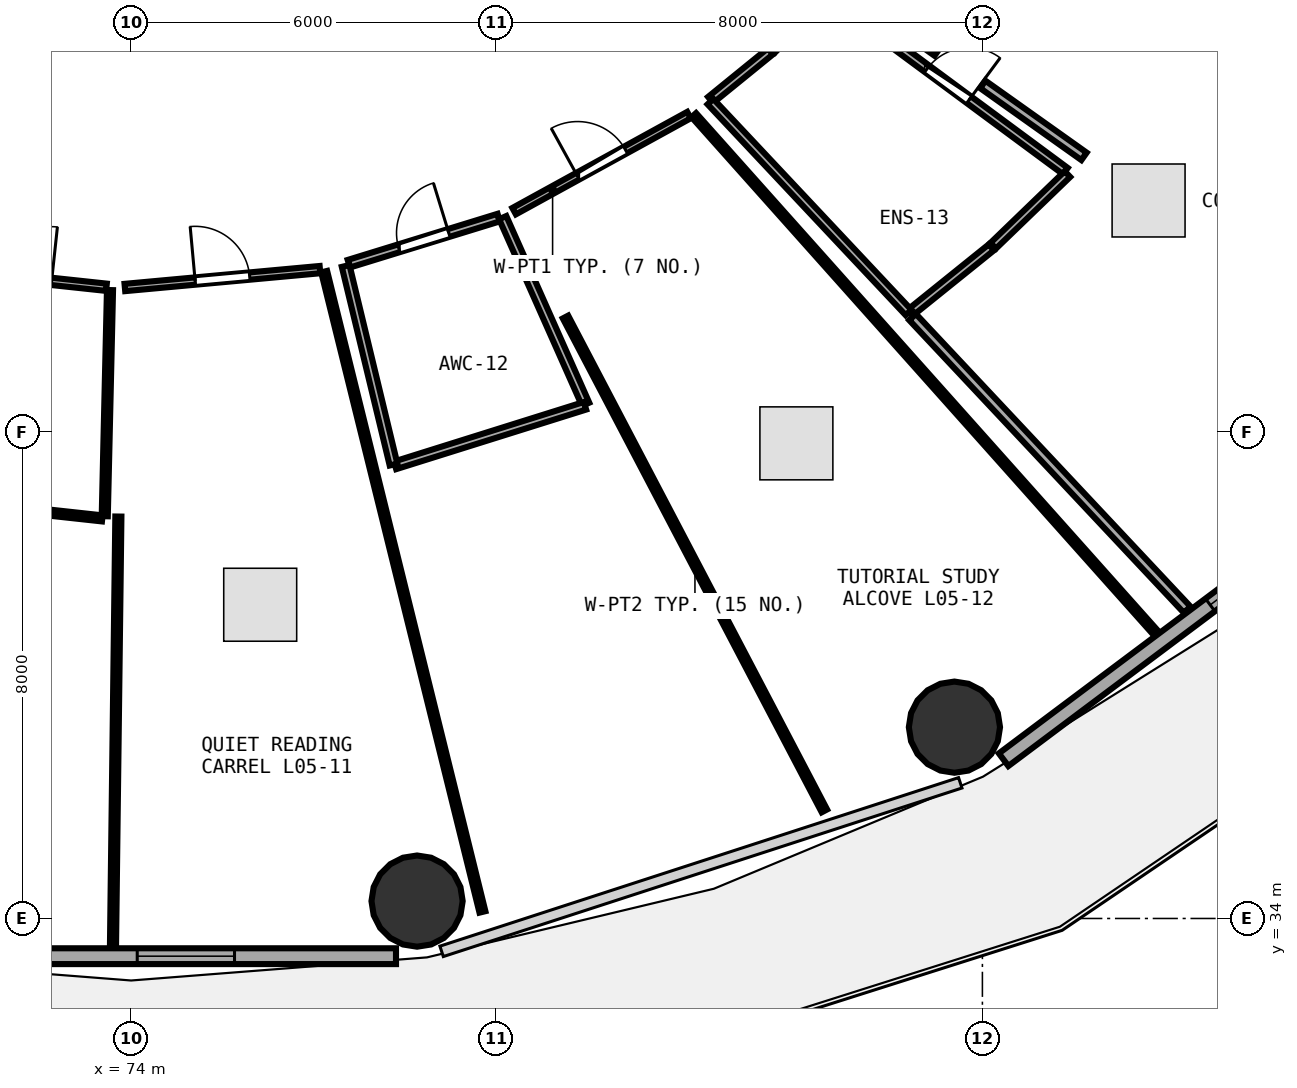
"""IFC4 building model, lengths in metres.
Left out: names, types, materials, properties, quantities, classifications, styles, units other than length and angle.
Written with IfcOpenShell. Run it as: python <this file> out.ifc"""

import sys

from ifc_helpers import new_model, si_unit, direction, frame, frame_2d, origin, origin_2d, place, context, subcontext, project, spatial, rectangle, circle, extrude, element, fill, save


model = new_model("IFC4")
c1 = context("Model", 3, precision=1e-05, world=origin(), true_north=direction((0.0, 1.0)))
c2 = subcontext(c1, "Body", "Model", "MODEL_VIEW")
j1 = project(units=[si_unit("LENGTHUNIT", "METRE"), si_unit("PLANEANGLEUNIT", "RADIAN")], contexts=[c1])
p1 = place(None, origin())
s1 = spatial("IfcSite", under=j1, at=p1, CompositionType="ELEMENT")
p2 = place(p1, origin())
s2 = spatial("IfcBuilding", under=s1, at=p2, CompositionType="ELEMENT")
p3 = place(p2, frame((0.0, 0.0, 22.5)))
s3 = spatial("IfcBuildingStorey", under=s2, at=p3, CompositionType="ELEMENT", Elevation=22.5)
for number, where, z_axis, x_axis in (
    (1, (78.702, 34.286, 0.0), (0.0, 0.0, 1.0), (1.0, 0.0, 0.0)),
    (2, (87.54, 37.146, 0.0), (0.0, 0.0, 1.0), (1.0, 0.0, 0.0)),
):
    element("IfcColumn", number, at=place(p3, frame(where, z_axis=z_axis, x_axis=x_axis)), inside=s3, PredefinedType="COLUMN", context=c2, shape_type="SweptSolid", body=[
        extrude(circle(Radius=0.75, at=origin_2d()), origin(), (0.0, 0.0, 1.0), 3.75),
    ])
p4 = place(p3, frame((69.644, 33.38, 0.0), z_axis=(0.0, 0.0, 1.0), x_axis=(1.0, 0.0, 0.0)))
e3 = element("IfcWall", 3, at=p4, inside=s3, PredefinedType="SOLIDWALL", context=c2, shape_type="SweptSolid", body=[
    extrude(rectangle(XDim=8.712, YDim=0.26, at=frame_2d((4.356, 0.0))), origin(), (0.0, 0.0, 1.0), 3.475),
])
p5 = place(p4, frame((4.456, 0.0, 0.85)))
e4 = element("IfcOpeningElement", 4, at=p5, cuts=e3, PredefinedType="OPENING", context=c2, shape_type="SweptSolid", body=[
    extrude(rectangle(XDim=1.6, YDim=1.45, at=frame_2d((0.8, 0.725))), frame((0.0, 0.14, 0.0), z_axis=(0.0, -1.0, 0.0), x_axis=(1.0, 0.0, 0.0)), (0.0, 0.0, 1.0), 0.28),
])
p6 = place(p3, frame((88.349, 36.611, 0.0), z_axis=(0.0, 0.0, 1.0), x_axis=(0.80030733173, 0.599590005569, 0.0)))
e5 = element("IfcWall", 5, at=p6, inside=s3, PredefinedType="SOLIDWALL", context=c2, shape_type="SweptSolid", body=[
    extrude(rectangle(XDim=8.291, YDim=0.26, at=frame_2d((4.145, 0.0))), origin(), (0.0, 0.0, 1.0), 3.475),
])
p7 = place(p6, frame((4.245, 0.0, 0.85)))
e6 = element("IfcOpeningElement", 6, at=p7, cuts=e5, PredefinedType="OPENING", context=c2, shape_type="SweptSolid", body=[
    extrude(rectangle(XDim=1.6, YDim=1.45, at=frame_2d((0.8, 0.725))), frame((0.0, 0.14, 0.0), z_axis=(0.0, -1.0, 0.0), x_axis=(1.0, 0.0, 0.0)), (0.0, 0.0, 1.0), 0.28),
])
p8 = place(p3, frame((70.895, 44.67, 0.0), z_axis=(0.0, 0.0, 1.0), x_axis=(0.994302004983, -0.106599825921, 0.0)))
e7 = element("IfcWall", 7, at=p8, inside=s3, PredefinedType="PARTITIONING", context=c2, shape_type="SweptSolid", body=[
    extrude(rectangle(XDim=2.714, YDim=0.12, at=frame_2d((1.357, 0.0))), origin(), (0.0, 0.0, 1.0), 3.235),
])
p9 = place(p8, frame((0.907, 0.0, 0.0)))
e8 = element("IfcOpeningElement", 8, at=p9, cuts=e7, PredefinedType="OPENING", context=c2, shape_type="SweptSolid", body=[
    extrude(rectangle(XDim=0.9, YDim=2.08, at=frame_2d((0.45, 1.04))), frame((0.0, 0.07, 0.0), z_axis=(0.0, -1.0, 0.0), x_axis=(1.0, 0.0, 0.0)), (0.0, 0.0, 1.0), 0.14),
])
p10 = place(p3, frame((73.897, 44.376, 0.0), z_axis=(0.0, 0.0, 1.0), x_axis=(0.995829610124, 0.091232601628, 0.0)))
e9 = element("IfcWall", 9, at=p10, inside=s3, PredefinedType="PARTITIONING", context=c2, shape_type="SweptSolid", body=[
    extrude(rectangle(XDim=3.222, YDim=0.12, at=frame_2d((1.611, 0.0))), origin(), (0.0, 0.0, 1.0), 3.235),
])
p11 = place(p10, frame((1.161, 0.0, 0.0)))
e10 = element("IfcOpeningElement", 10, at=p11, cuts=e9, PredefinedType="OPENING", context=c2, shape_type="SweptSolid", body=[
    extrude(rectangle(XDim=0.9, YDim=2.08, at=frame_2d((0.45, 1.04))), frame((0.0, 0.07, 0.0), z_axis=(0.0, -1.0, 0.0), x_axis=(1.0, 0.0, 0.0)), (0.0, 0.0, 1.0), 0.14),
])
p12 = place(p3, frame((77.58, 44.768, 0.0), z_axis=(0.0, 0.0, 1.0), x_axis=(0.955754448098, 0.294165659011, 0.0)))
e11 = element("IfcWall", 11, at=p12, inside=s3, PredefinedType="PLUMBINGWALL", context=c2, shape_type="SweptSolid", body=[
    extrude(rectangle(XDim=2.579, YDim=0.13, at=frame_2d((1.29, 0.0))), origin(), (0.0, 0.0, 1.0), 3.235),
])
p13 = place(p12, frame((0.86, 0.0, 0.0)))
e12 = element("IfcOpeningElement", 12, at=p13, cuts=e11, PredefinedType="OPENING", context=c2, shape_type="SweptSolid", body=[
    extrude(rectangle(XDim=0.86, YDim=2.05, at=frame_2d((0.43, 1.025))), frame((0.0, 0.075, 0.0), z_axis=(0.0, -1.0, 0.0), x_axis=(1.0, 0.0, 0.0)), (0.0, 0.0, 1.0), 0.15),
])
p14 = place(p3, frame((80.299, 45.632, 0.0), z_axis=(0.0, 0.0, 1.0), x_axis=(0.876387079092, 0.481607399861, 0.0)))
e13 = element("IfcWall", 13, at=p14, inside=s3, PredefinedType="PARTITIONING", context=c2, shape_type="SweptSolid", body=[
    extrude(rectangle(XDim=3.281, YDim=0.12, at=frame_2d((1.641, 0.0))), origin(), (0.0, 0.0, 1.0), 2.875),
])
p15 = place(p14, frame((1.191, 0.0, 0.0)))
e14 = element("IfcOpeningElement", 14, at=p15, cuts=e13, PredefinedType="OPENING", context=c2, shape_type="SweptSolid", body=[
    extrude(rectangle(XDim=0.9, YDim=2.08, at=frame_2d((0.45, 1.04))), frame((0.0, 0.07, 0.0), z_axis=(0.0, -1.0, 0.0), x_axis=(1.0, 0.0, 0.0)), (0.0, 0.0, 1.0), 0.14),
])
p16 = place(p3, frame((85.506, 49.143, 0.0), z_axis=(0.0, 0.0, 1.0), x_axis=(0.80412644244, -0.594458295063, 0.0)))
e15 = element("IfcWall", 15, at=p16, inside=s3, PredefinedType="PLUMBINGWALL", context=c2, shape_type="SweptSolid", body=[
    extrude(rectangle(XDim=4.799, YDim=0.13, at=frame_2d((2.399, 0.0))), origin(), (0.0, 0.0, 1.0), 2.875),
])
p17 = place(p16, frame((1.969, 0.0, 0.0)))
e16 = element("IfcOpeningElement", 16, at=p17, cuts=e15, PredefinedType="OPENING", context=c2, shape_type="SweptSolid", body=[
    extrude(rectangle(XDim=0.86, YDim=2.05, at=frame_2d((0.43, 1.025))), frame((0.0, 0.075, 0.0), z_axis=(0.0, -1.0, 0.0), x_axis=(1.0, 0.0, 0.0)), (0.0, 0.0, 1.0), 0.15),
])
p18 = place(p3, frame((73.652, 44.334, 0.0), z_axis=(0.0, 0.0, 1.0), x_axis=(-0.02316715399, -0.99973160547, 0.0)))
e17 = element("IfcWall", 17, at=p18, inside=s3, PredefinedType="PARTITIONING", context=c2, shape_type="SweptSolid", body=[
    extrude(rectangle(XDim=3.72, YDim=0.1, at=frame_2d((1.86, 0.0))), origin(), (0.0, 0.0, 1.0), 3.175),
])
p19 = place(p3, frame((73.525, 40.579, 0.0), z_axis=(0.0, 0.0, 1.0), x_axis=(-0.994070147468, 0.108740709544, 0.0)))
e18 = element("IfcWall", 18, at=p19, inside=s3, PredefinedType="PARTITIONING", context=c2, shape_type="SweptSolid", body=[
    extrude(rectangle(XDim=3.471, YDim=0.1, at=frame_2d((1.735, 0.0))), origin(), (0.0, 0.0, 1.0), 3.175),
])
p20 = place(p3, frame((77.175, 44.637, 0.0), z_axis=(0.0, 0.0, 1.0), x_axis=(0.239971369295, -0.970779965759, 0.0)))
e19 = element("IfcWall", 19, at=p20, inside=s3, PredefinedType="PARTITIONING", context=c2, shape_type="SweptSolid", body=[
    extrude(rectangle(XDim=10.846, YDim=0.1, at=frame_2d((5.423, 0.0))), origin(), (0.0, 0.0, 1.0), 2.875),
])
p21 = place(p3, frame((73.701, 33.561, 0.0), z_axis=(0.0, 0.0, 1.0), x_axis=(0.012537113793, 0.9999214073, 0.0)))
e20 = element("IfcWall", 20, at=p21, inside=s3, PredefinedType="PARTITIONING", context=c2, shape_type="SweptSolid", body=[
    extrude(rectangle(XDim=7.049, YDim=0.1, at=frame_2d((3.525, 0.0))), origin(), (0.0, 0.0, 1.0), 2.875),
])
p22 = place(p3, frame((80.111, 45.526, 0.0), z_axis=(0.0, 0.0, 1.0), x_axis=(0.405936178007, -0.913901427608, 0.0)))
e21 = element("IfcWall", 21, at=p22, inside=s3, PredefinedType="PLUMBINGWALL", context=c2, shape_type="SweptSolid", body=[
    extrude(rectangle(XDim=3.36, YDim=0.13, at=frame_2d((1.68, 0.0))), origin(), (0.0, 0.0, 1.0), 2.875),
])
p23 = place(p3, frame((81.464, 42.431, 0.0), z_axis=(0.0, 0.0, 1.0), x_axis=(-0.954175708416, -0.299246917226, 0.0)))
e22 = element("IfcWall", 22, at=p23, inside=s3, PredefinedType="PLUMBINGWALL", context=c2, shape_type="SweptSolid", body=[
    extrude(rectangle(XDim=3.275, YDim=0.13, at=frame_2d((1.637, 0.0))), origin(), (0.0, 0.0, 1.0), 2.875),
])
p24 = place(p3, frame((78.315, 41.464, 0.0), z_axis=(0.0, 0.0, 1.0), x_axis=(-0.234406131581, 0.972138758345, 0.0)))
e23 = element("IfcWall", 23, at=p24, inside=s3, PredefinedType="PLUMBINGWALL", context=c2, shape_type="SweptSolid", body=[
    extrude(rectangle(XDim=3.36, YDim=0.13, at=frame_2d((1.68, 0.0))), origin(), (0.0, 0.0, 1.0), 3.235),
])
p25 = place(p3, frame((83.254, 47.211, 0.0), z_axis=(0.0, 0.0, 1.0), x_axis=(0.66580890104, -0.746122313897, 0.0)))
e24 = element("IfcWall", 24, at=p25, inside=s3, PredefinedType="PARTITIONING", context=c2, shape_type="SweptSolid", body=[
    extrude(rectangle(XDim=11.399, YDim=0.1, at=frame_2d((5.7, 0.0))), origin(), (0.0, 0.0, 1.0), 2.875),
])
p26 = place(p3, frame((85.401, 35.769, 0.0), z_axis=(0.0, 0.0, 1.0), x_axis=(-0.464308397246, 0.885673592384, 0.0)))
e25 = element("IfcWall", 25, at=p26, inside=s3, PredefinedType="PARTITIONING", context=c2, shape_type="SweptSolid", body=[
    extrude(rectangle(XDim=9.17, YDim=0.1, at=frame_2d((4.585, 0.0))), origin(), (0.0, 0.0, 1.0), 2.875),
])
p27 = place(p3, frame((83.53, 47.461, 0.0), z_axis=(0.0, 0.0, 1.0), x_axis=(0.77596084644, 0.63078107517, 0.0)))
e26 = element("IfcWall", 26, at=p27, inside=s3, PredefinedType="PLUMBINGWALL", context=c2, shape_type="SweptSolid", body=[
    extrude(rectangle(XDim=1.268, YDim=0.13, at=frame_2d((0.634, 0.0))), origin(), (0.0, 0.0, 1.0), 2.875),
])
p28 = place(p3, frame((84.543, 48.287, 0.0), z_axis=(0.0, 0.0, 1.0), x_axis=(0.715980731769, 0.698120041064, 0.0)))
e27 = element("IfcWall", 27, at=p28, inside=s3, PredefinedType="PLUMBINGWALL", context=c2, shape_type="SweptSolid", body=[
    extrude(rectangle(XDim=1.258, YDim=0.13, at=frame_2d((0.629, 0.0))), origin(), (0.0, 0.0, 1.0), 2.875),
])
p29 = place(p3, frame((89.399, 46.241, 0.0), z_axis=(0.0, 0.0, 1.0), x_axis=(-0.719664402118, -0.694322078234, 0.0)))
e28 = element("IfcWall", 28, at=p29, inside=s3, PredefinedType="PLUMBINGWALL", context=c2, shape_type="SweptSolid", body=[
    extrude(rectangle(XDim=1.696, YDim=0.13, at=frame_2d((0.848, 0.0))), origin(), (0.0, 0.0, 1.0), 2.875),
])
p30 = place(p3, frame((88.148, 45.038, 0.0), z_axis=(0.0, 0.0, 1.0), x_axis=(-0.778806140639, -0.627264693174, 0.0)))
e29 = element("IfcWall", 29, at=p30, inside=s3, PredefinedType="PLUMBINGWALL", context=c2, shape_type="SweptSolid", body=[
    extrude(rectangle(XDim=1.713, YDim=0.13, at=frame_2d((0.856, 0.0))), origin(), (0.0, 0.0, 1.0), 3.175),
])
p31 = place(p3, frame((86.785, 43.966, 0.0), z_axis=(0.0, 0.0, 1.0), x_axis=(-0.68469858897, 0.728826345753, 0.0)))
e30 = element("IfcWall", 30, at=p31, inside=s3, PredefinedType="PLUMBINGWALL", context=c2, shape_type="SweptSolid", body=[
    extrude(rectangle(XDim=4.758, YDim=0.13, at=frame_2d((2.379, 0.0))), origin(), (0.0, 0.0, 1.0), 2.875),
])
p32 = place(p3, frame((87.498, 51.921, 0.0), z_axis=(0.0, 0.0, 1.0), x_axis=(0.917695041134, -0.397285554077, 0.0)))
e31 = element("IfcWall", 31, at=p32, inside=s3, PredefinedType="PARTITIONING", context=c2, shape_type="SweptSolid", body=[
    extrude(rectangle(XDim=12.07, YDim=0.15, at=frame_2d((6.035, 0.0))), origin(), (0.0, 0.0, 1.0), 2.875),
])
p33 = place(p3, frame((91.368, 39.078, 0.0), z_axis=(0.0, 0.0, 1.0), x_axis=(-0.684296653493, 0.729203736975, 0.0)))
e32 = element("IfcWall", 32, at=p33, inside=s3, PredefinedType="PARTITIONING", context=c2, shape_type="SweptSolid", body=[
    extrude(rectangle(XDim=6.6, YDim=0.15, at=frame_2d((3.3, 0.0))), origin(), (0.0, 0.0, 1.0), 2.875),
])
p34 = place(p3, frame((89.671, 46.533, 0.0), z_axis=(0.0, 0.0, 1.0), x_axis=(-0.815281399299, 0.579064970411, 0.0)))
e33 = element("IfcWall", 33, at=p34, inside=s3, PredefinedType="PARTITIONING", context=c2, shape_type="SweptSolid", body=[
    extrude(rectangle(XDim=2.042, YDim=0.15, at=frame_2d((1.021, 0.0))), origin(), (0.0, 0.0, 1.0), 3.48),
])
p35 = place(p3, frame((87.256, 48.249, 0.0), z_axis=(0.0, 0.0, 1.0), x_axis=(-0.815270043711, 0.579080957922, 0.0)))
e34 = element("IfcWall", 34, at=p35, inside=s3, PredefinedType="PARTITIONING", context=c2, shape_type="SweptSolid", body=[
    extrude(rectangle(XDim=1.929, YDim=0.15, at=frame_2d((0.964, 0.0))), origin(), (0.0, 0.0, 1.0), 3.235),
])
p36 = place(p5, origin())
e35 = element("IfcWindow", 35, at=p36, inside=s3, PartitioningType="SINGLE_PANEL", PredefinedType="WINDOW", context=c2, shape_type="SweptSolid", body=[
    extrude(rectangle(XDim=1.6, YDim=1.45, at=frame_2d((0.8, 0.725))), frame((0.0, 0.03, 0.0), z_axis=(0.0, -1.0, 0.0), x_axis=(1.0, 0.0, 0.0)), (0.0, 0.0, 1.0), 0.06),
])
fill(e4, e35)
p37 = place(p7, origin())
e36 = element("IfcWindow", 36, at=p37, inside=s3, PartitioningType="SINGLE_PANEL", PredefinedType="WINDOW", context=c2, shape_type="SweptSolid", body=[
    extrude(rectangle(XDim=1.6, YDim=1.45, at=frame_2d((0.8, 0.725))), frame((0.0, 0.03, 0.0), z_axis=(0.0, -1.0, 0.0), x_axis=(1.0, 0.0, 0.0)), (0.0, 0.0, 1.0), 0.06),
])
fill(e6, e36)
p38 = place(p11, origin())
e37 = element("IfcDoor", 37, at=p38, inside=s3, OperationType="SINGLE_SWING_LEFT", PredefinedType="DOOR", context=c2, shape_type="SweptSolid", body=[
    extrude(rectangle(XDim=0.9, YDim=2.08, at=frame_2d((0.45, 1.04))), frame((0.0, 0.025, 0.0), z_axis=(0.0, -1.0, 0.0), x_axis=(1.0, 0.0, 0.0)), (0.0, 0.0, 1.0), 0.05),
])
fill(e10, e37)
p39 = place(p13, origin())
e38 = element("IfcDoor", 38, at=p39, inside=s3, OperationType="SINGLE_SWING_RIGHT", PredefinedType="DOOR", context=c2, shape_type="SweptSolid", body=[
    extrude(rectangle(XDim=0.86, YDim=2.05, at=frame_2d((0.43, 1.025))), frame((0.0, 0.025, 0.0), z_axis=(0.0, -1.0, 0.0), x_axis=(1.0, 0.0, 0.0)), (0.0, 0.0, 1.0), 0.05),
])
fill(e12, e38)
p40 = place(p15, origin())
e39 = element("IfcDoor", 39, at=p40, inside=s3, OperationType="SINGLE_SWING_LEFT", PredefinedType="DOOR", context=c2, shape_type="SweptSolid", body=[
    extrude(rectangle(XDim=0.9, YDim=2.08, at=frame_2d((0.45, 1.04))), frame((0.0, 0.025, 0.0), z_axis=(0.0, -1.0, 0.0), x_axis=(1.0, 0.0, 0.0)), (0.0, 0.0, 1.0), 0.05),
])
fill(e14, e39)
p41 = place(p17, origin())
e40 = element("IfcDoor", 40, at=p41, inside=s3, OperationType="SINGLE_SWING_RIGHT", PredefinedType="DOOR", context=c2, shape_type="SweptSolid", body=[
    extrude(rectangle(XDim=0.86, YDim=2.05, at=frame_2d((0.43, 1.025))), frame((0.0, 0.025, 0.0), z_axis=(0.0, -1.0, 0.0), x_axis=(1.0, 0.0, 0.0)), (0.0, 0.0, 1.0), 0.05),
])
fill(e16, e40)
save(model, sys.argv[1])
